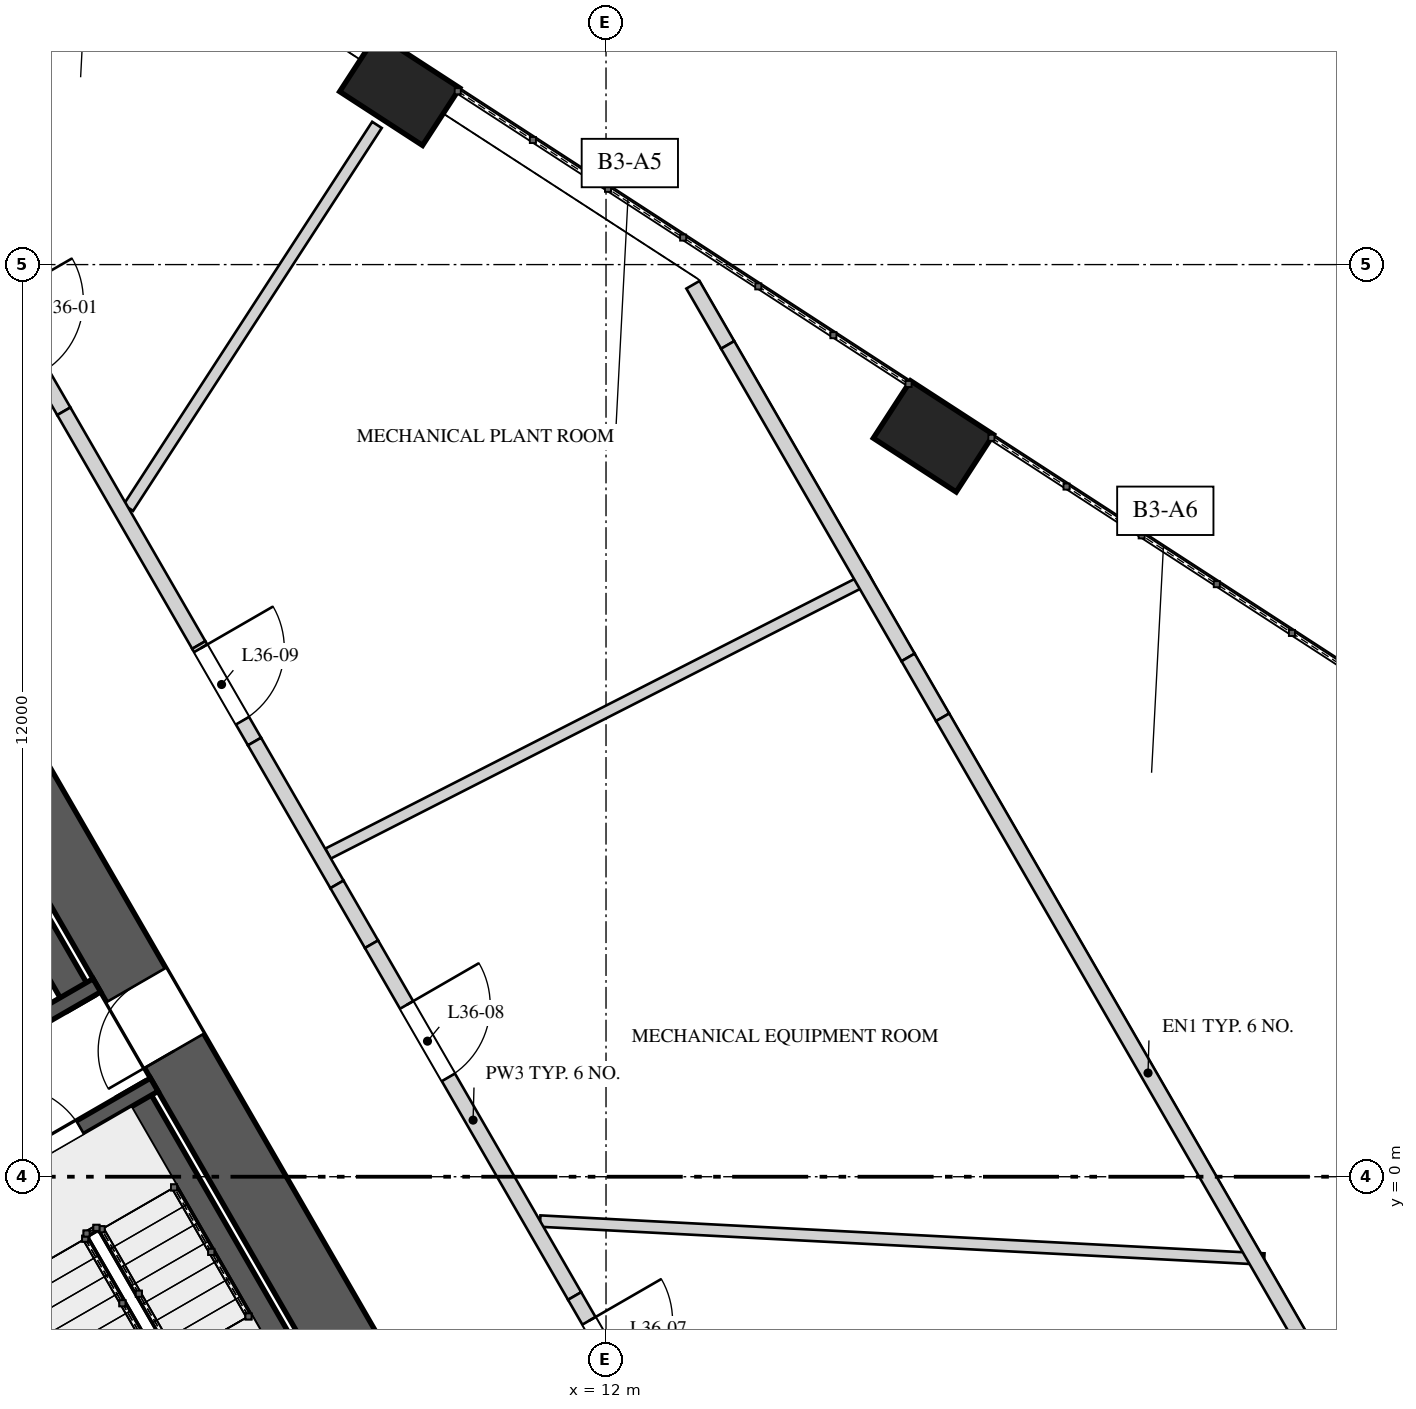
"""IFC4 building model, lengths in metres.
Left out: names, types, materials, properties, quantities, classifications, styles, units other than length and angle.
Written with IfcOpenShell. Run it as: python <this file> out.ifc"""

import sys

from ifc_helpers import new_model, si_unit, direction, frame, frame_2d, origin, origin_2d, place, context, subcontext, project, spatial, polyline, rectangle, outline, extrude, element, fill, save


model = new_model("IFC4")
c1 = context("Model", 3, precision=1e-05, world=origin(), true_north=direction((0.0, 1.0)))
c2 = subcontext(c1, "Body", "Model", "MODEL_VIEW")
j1 = project(units=[si_unit("LENGTHUNIT", "METRE"), si_unit("PLANEANGLEUNIT", "RADIAN")], contexts=[c1])
p1 = place(None, origin())
s1 = spatial("IfcSite", under=j1, at=p1, CompositionType="ELEMENT")
p2 = place(p1, origin())
s2 = spatial("IfcBuilding", under=s1, at=p2, CompositionType="ELEMENT")
p3 = place(p2, frame((0.0, 0.0, 157.6)))
s3 = spatial("IfcBuildingStorey", under=s2, at=p3, CompositionType="ELEMENT", Elevation=157.6)
p4 = place(p3, frame((9.729, -4.25, 0.0), z_axis=(0.0, 0.0, 1.0), x_axis=(-0.500004814304, 0.866022624227, 0.0)))
e1 = element("IfcWall", 1, at=p4, inside=s3, PredefinedType="SHEAR", context=c2, shape_type="SweptSolid", body=[
    extrude(rectangle(XDim=17.09, YDim=0.9, at=frame_2d((8.545, 0.0))), origin(), (0.0, 0.0, 1.0), 5.2),
])
p5 = place(p4, frame((6.82, 0.0, 0.0)))
e2 = element("IfcOpeningElement", 2, at=p5, cuts=e1, PredefinedType="OPENING", context=c2, shape_type="SweptSolid", body=[
    extrude(rectangle(XDim=1.0, YDim=2.4, at=frame_2d((0.5, 1.2))), frame((0.0, 0.46, 0.0), z_axis=(0.0, -1.0, 0.0), x_axis=(1.0, 0.0, 0.0)), (0.0, 0.0, 1.0), 0.92),
])
p6 = place(p4, frame((14.184, 0.0, 0.0)))
e3 = element("IfcOpeningElement", 3, at=p6, cuts=e1, PredefinedType="OPENING", context=c2, shape_type="SweptSolid", body=[
    extrude(rectangle(XDim=0.8, YDim=2.1, at=frame_2d((0.4, 1.05))), frame((0.0, 0.46, 0.0), z_axis=(0.0, -1.0, 0.0), x_axis=(1.0, 0.0, 0.0)), (0.0, 0.0, 1.0), 0.92),
])
for number, where, z_axis, x_axis in (
    (4, (16.307, 9.74, 0.0), (0.0, 0.0, 1.0), (-0.839, 0.545, 0.0)),
    (5, (9.286, 14.299, 0.0), (0.0, 0.0, 1.0), (-0.839, 0.545, 0.0)),
):
    element("IfcColumn", number, at=place(p3, frame(where, z_axis=z_axis, x_axis=x_axis)), inside=s3, PredefinedType="COLUMN", context=c2, shape_type="SweptSolid", body=[
        extrude(rectangle(XDim=1.3, YDim=0.9, at=origin_2d()), origin(), (0.0, 0.0, 1.0), 2.835),
    ])
p7 = place(p3, frame((8.846, -4.222, 0.0), z_axis=(0.0, 0.0, 1.0), x_axis=(-0.500009909098, 0.866019682689, 0.0)))
e6 = element("IfcWall", 6, at=p7, inside=s3, PredefinedType="SOLIDWALL", context=c2, shape_type="SweptSolid", body=[
    extrude(rectangle(XDim=6.2, YDim=0.4, at=frame_2d((3.1, 0.0))), origin(), (0.0, 0.0, 1.0), 4.85),
])
p8 = place(p3, frame((6.611, -5.85, 0.0), z_axis=(0.0, 0.0, 1.0), x_axis=(-0.499965531574, 0.866045303225, 0.0)))
e7 = element("IfcWall", 7, at=p8, inside=s3, PredefinedType="SOLIDWALL", context=c2, shape_type="SweptSolid", body=[
    extrude(rectangle(XDim=6.492, YDim=0.2, at=frame_2d((3.246, 0.0))), origin(), (0.0, 0.0, 1.0), 4.85),
])
p9 = place(p3, frame((3.501, -0.265, 0.0), z_axis=(0.0, 0.0, 1.0), x_axis=(0.866039495442, 0.49997559174, 0.0)))
e8 = element("IfcWall", 8, at=p9, inside=s3, PredefinedType="SOLIDWALL", context=c2, shape_type="SweptSolid", body=[
    extrude(rectangle(XDim=2.95, YDim=0.2, at=frame_2d((1.475, 0.0))), origin(), (0.0, 0.0, 1.0), 4.85),
])
p10 = place(p9, frame((0.725, 0.0, 0.0)))
e9 = element("IfcOpeningElement", 9, at=p10, cuts=e8, PredefinedType="OPENING", context=c2, shape_type="SweptSolid", body=[
    extrude(rectangle(XDim=1.1, YDim=2.4, at=frame_2d((0.55, 1.2))), frame((0.0, 0.11, 0.0), z_axis=(0.0, -1.0, 0.0), x_axis=(1.0, 0.0, 0.0)), (0.0, 0.0, 1.0), 0.22),
])
p11 = place(p3, frame((5.092, 2.281, 0.0), z_axis=(0.0, 0.0, 1.0), x_axis=(-0.500018594424, 0.866014668023, 0.0)))
e10 = element("IfcWall", 10, at=p11, inside=s3, PredefinedType="SOLIDWALL", context=c2, shape_type="SweptSolid", body=[
    extrude(rectangle(XDim=4.9, YDim=0.4, at=frame_2d((2.45, 0.0))), origin(), (0.0, 0.0, 1.0), 4.85),
])
p12 = place(p3, frame((2.227, 0.743, 0.0), z_axis=(0.0, 0.0, 1.0), x_axis=(0.866012656725, 0.500022077904, 0.0)))
e11 = element("IfcWall", 11, at=p12, inside=s3, PredefinedType="SOLIDWALL", context=c2, shape_type="SweptSolid", body=[
    extrude(rectangle(XDim=3.55, YDim=0.2, at=frame_2d((1.775, 0.0))), origin(), (0.0, 0.0, 1.0), 4.85),
])
p13 = place(p3, frame((8.342, 4.251, 0.0), z_axis=(0.0, 0.0, 1.0), x_axis=(0.891018796903, 0.453966412377, 0.0)))
e12 = element("IfcWall", 12, at=p13, inside=s3, PredefinedType="PARTITIONING", context=c2, shape_type="SweptSolid", body=[
    extrude(rectangle(XDim=8.011, YDim=0.15, at=frame_2d((4.005, 0.0))), origin(), (0.0, 0.0, 1.0), 4.85),
])
p14 = place(p3, frame((8.987, 13.838, 0.0), z_axis=(0.0, 0.0, 1.0), x_axis=(-0.544632548775, -0.838674780123, 0.0)))
e13 = element("IfcWall", 13, at=p14, inside=s3, PredefinedType="PARTITIONING", context=c2, shape_type="SweptSolid", body=[
    extrude(rectangle(XDim=6.006, YDim=0.15, at=frame_2d((3.003, 0.0))), origin(), (0.0, 0.0, 1.0), 4.85),
])
p15 = place(p3, frame((11.133, -0.583, 0.0), z_axis=(0.0, 0.0, 1.0), x_axis=(0.998629329727, -0.052339868248, 0.0)))
e14 = element("IfcWall", 14, at=p15, inside=s3, PredefinedType="PARTITIONING", context=c2, shape_type="SweptSolid", body=[
    extrude(rectangle(XDim=9.539, YDim=0.15, at=frame_2d((4.77, 0.0))), origin(), (0.0, 0.0, 1.0), 4.85),
])
p16 = place(p3, frame((3.998, 11.575, 0.0), z_axis=(0.0, 0.0, 1.0), x_axis=(0.500038750527, -0.866003030001, 0.0)))
e15 = element("IfcWall", 15, at=p16, inside=s3, PredefinedType="SOLIDWALL", context=c2, shape_type="SweptSolid", body=[
    extrude(outline(polyline([(0.0, 0.0), (1.737, 0.0), (1.737, 4.15), (0.872, 4.15), (0.872, 4.85), (0.0, 4.85), (0.0, 0.0)])), frame((0.0, 0.1, 0.0), z_axis=(0.0, -1.0, 0.0), x_axis=(1.0, 0.0, 0.0)), (0.0, 0.0, 1.0), 0.2),
])
p17 = place(p16, frame((0.05, 0.0, 0.0)))
e16 = element("IfcOpeningElement", 16, at=p17, cuts=e15, PredefinedType="OPENING", context=c2, shape_type="SweptSolid", body=[
    extrude(rectangle(XDim=1.1, YDim=2.2, at=frame_2d((0.55, 1.1))), frame((0.0, 0.11, 0.0), z_axis=(0.0, -1.0, 0.0), x_axis=(1.0, 0.0, 0.0)), (0.0, 0.0, 1.0), 0.22),
])
p18 = place(p3, frame((4.867, 10.071, 0.0), z_axis=(0.0, 0.0, 1.0), x_axis=(0.50003588878, -0.866004682396, 0.0)))
e17 = element("IfcWall", 17, at=p18, inside=s3, PredefinedType="SOLIDWALL", context=c2, shape_type="SweptSolid", body=[
    extrude(rectangle(XDim=3.551, YDim=0.2, at=frame_2d((1.775, 0.0))), origin(), (0.0, 0.0, 1.0), 4.85),
])
p19 = place(p3, frame((6.642, 6.995, 0.0), z_axis=(0.0, 0.0, 1.0), x_axis=(0.499953038101, -0.866052515552, 0.0)))
e18 = element("IfcWall", 18, at=p19, inside=s3, PredefinedType="SOLIDWALL", context=c2, shape_type="SweptSolid", body=[
    extrude(outline(polyline([(0.0, 0.0), (1.467, 0.0), (1.467, 4.15), (0.756, 4.15), (0.756, 4.85), (0.0, 4.85), (0.0, 0.0)])), frame((0.0, 0.1, 0.0), z_axis=(0.0, -1.0, 0.0), x_axis=(1.0, 0.0, 0.0)), (0.0, 0.0, 1.0), 0.2),
])
p20 = place(p19, frame((0.05, 0.0, 0.0)))
e19 = element("IfcOpeningElement", 19, at=p20, cuts=e18, PredefinedType="OPENING", context=c2, shape_type="SweptSolid", body=[
    extrude(rectangle(XDim=1.1, YDim=2.2, at=frame_2d((0.55, 1.1))), frame((0.0, 0.11, 0.0), z_axis=(0.0, -1.0, 0.0), x_axis=(1.0, 0.0, 0.0)), (0.0, 0.0, 1.0), 0.22),
])
p21 = place(p3, frame((7.375, 5.725, 0.0), z_axis=(0.0, 0.0, 1.0), x_axis=(0.499975720793, -0.866039420937, 0.0)))
e20 = element("IfcWall", 20, at=p21, inside=s3, PredefinedType="SOLIDWALL", context=c2, shape_type="SweptSolid", body=[
    extrude(rectangle(XDim=2.169, YDim=0.2, at=frame_2d((1.085, 0.0))), origin(), (0.0, 0.0, 1.0), 4.85),
])
p22 = place(p3, frame((8.46, 3.846, 0.0), z_axis=(0.0, 0.0, 1.0), x_axis=(0.499977996243, -0.866038107287, 0.0)))
e21 = element("IfcWall", 21, at=p22, inside=s3, PredefinedType="SOLIDWALL", context=c2, shape_type="SweptSolid", body=[
    extrude(rectangle(XDim=0.91, YDim=0.2, at=frame_2d((0.455, 0.0))), origin(), (0.0, 0.0, 1.0), 3.75),
])
p23 = place(p3, frame((8.915, 3.059, 0.0), z_axis=(0.0, 0.0, 1.0), x_axis=(0.500011158634, -0.866018961248, 0.0)))
e22 = element("IfcWall", 22, at=p23, inside=s3, PredefinedType="SOLIDWALL", context=c2, shape_type="SweptSolid", body=[
    extrude(rectangle(XDim=5.344, YDim=0.2, at=frame_2d((2.672, 0.0))), origin(), (0.0, 0.0, 1.0), 4.85),
])
p24 = place(p23, frame((0.922, 0.0, 0.0)))
e23 = element("IfcOpeningElement", 23, at=p24, cuts=e22, PredefinedType="OPENING", context=c2, shape_type="SweptSolid", body=[
    extrude(rectangle(XDim=1.1, YDim=2.2, at=frame_2d((0.55, 1.1))), frame((0.0, 0.11, 0.0), z_axis=(0.0, -1.0, 0.0), x_axis=(1.0, 0.0, 0.0)), (0.0, 0.0, 1.0), 0.22),
])
p25 = place(p3, frame((11.587, -1.569, 0.0), z_axis=(0.0, 0.0, 1.0), x_axis=(0.500008507724, -0.866020491792, 0.0)))
e24 = element("IfcWall", 24, at=p25, inside=s3, PredefinedType="SOLIDWALL", context=c2, shape_type="SweptSolid", body=[
    extrude(outline(polyline([(0.0, 0.0), (1.527, 0.0), (1.527, 4.85), (1.039, 4.85), (1.039, 3.95), (0.0, 3.95), (0.0, 0.0)])), frame((0.0, 0.1, 0.0), z_axis=(0.0, -1.0, 0.0), x_axis=(1.0, 0.0, 0.0)), (0.0, 0.0, 1.0), 0.2),
])
p26 = place(p25, frame((0.377, 0.0, 0.0)))
e25 = element("IfcOpeningElement", 25, at=p26, cuts=e24, PredefinedType="OPENING", context=c2, shape_type="SweptSolid", body=[
    extrude(rectangle(XDim=1.1, YDim=2.2, at=frame_2d((0.55, 1.1))), frame((0.0, 0.11, 0.0), z_axis=(0.0, -1.0, 0.0), x_axis=(1.0, 0.0, 0.0)), (0.0, 0.0, 1.0), 0.22),
])
p27 = place(p3, frame((13.144, 11.735, 0.0), z_axis=(0.0, 0.0, 1.0), x_axis=(0.500046162864, -0.865998750002, 0.0)))
e26 = element("IfcWall", 26, at=p27, inside=s3, PredefinedType="SOLIDWALL", context=c2, shape_type="SweptSolid", body=[
    extrude(rectangle(XDim=0.914, YDim=0.2, at=frame_2d((0.457, 0.0))), origin(), (0.0, 0.0, 1.0), 4.15),
])
p28 = place(p3, frame((13.601, 10.943, 0.0), z_axis=(0.0, 0.0, 1.0), x_axis=(0.499983650561, -0.866034842932, 0.0)))
e27 = element("IfcWall", 27, at=p28, inside=s3, PredefinedType="SOLIDWALL", context=c2, shape_type="SweptSolid", body=[
    extrude(rectangle(XDim=4.747, YDim=0.2, at=frame_2d((2.374, 0.0))), origin(), (0.0, 0.0, 1.0), 4.85),
])
p29 = place(p3, frame((15.974, 6.832, 0.0), z_axis=(0.0, 0.0, 1.0), x_axis=(0.499977996243, -0.866038107287, 0.0)))
e28 = element("IfcWall", 28, at=p29, inside=s3, PredefinedType="SOLIDWALL", context=c2, shape_type="SweptSolid", body=[
    extrude(rectangle(XDim=0.91, YDim=0.2, at=frame_2d((0.455, 0.0))), origin(), (0.0, 0.0, 1.0), 3.75),
])
p30 = place(p3, frame((16.429, 6.044, 0.0), z_axis=(0.0, 0.0, 1.0), x_axis=(0.500009239692, -0.86602006918, 0.0)))
e29 = element("IfcWall", 29, at=p30, inside=s3, PredefinedType="SOLIDWALL", context=c2, shape_type="SweptSolid", body=[
    extrude(rectangle(XDim=10.808, YDim=0.2, at=frame_2d((5.404, 0.0))), origin(), (0.0, 0.0, 1.0), 4.85),
])
p31 = place(p10, origin())
e30 = element("IfcDoor", 30, at=p31, inside=s3, OperationType="SINGLE_SWING_RIGHT", PredefinedType="DOOR", context=c2, shape_type="SweptSolid", body=[
    extrude(rectangle(XDim=1.1, YDim=2.4, at=frame_2d((0.55, 1.2))), frame((0.0, 0.025, 0.0), z_axis=(0.0, -1.0, 0.0), x_axis=(1.0, 0.0, 0.0)), (0.0, 0.0, 1.0), 0.05),
])
fill(e9, e30)
p32 = place(p5, origin())
e31 = element("IfcDoor", 31, at=p32, inside=s3, OperationType="SINGLE_SWING_RIGHT", PredefinedType="DOOR", context=c2, shape_type="SweptSolid", body=[
    extrude(rectangle(XDim=1.0, YDim=2.4, at=frame_2d((0.5, 1.2))), frame((0.0, 0.025, 0.0), z_axis=(0.0, -1.0, 0.0), x_axis=(1.0, 0.0, 0.0)), (0.0, 0.0, 1.0), 0.05),
])
fill(e2, e31)
p33 = place(p26, origin())
e32 = element("IfcDoor", 32, at=p33, inside=s3, OperationType="SINGLE_SWING_LEFT", PredefinedType="DOOR", context=c2, shape_type="SweptSolid", body=[
    extrude(rectangle(XDim=1.1, YDim=2.2, at=frame_2d((0.55, 1.1))), frame((0.0, 0.025, 0.0), z_axis=(0.0, -1.0, 0.0), x_axis=(1.0, 0.0, 0.0)), (0.0, 0.0, 1.0), 0.05),
])
fill(e25, e32)
p34 = place(p24, origin())
e33 = element("IfcDoor", 33, at=p34, inside=s3, OperationType="SINGLE_SWING_RIGHT", PredefinedType="DOOR", context=c2, shape_type="SweptSolid", body=[
    extrude(rectangle(XDim=1.1, YDim=2.2, at=frame_2d((0.55, 1.1))), frame((0.0, 0.025, 0.0), z_axis=(0.0, -1.0, 0.0), x_axis=(1.0, 0.0, 0.0)), (0.0, 0.0, 1.0), 0.05),
])
fill(e23, e33)
p35 = place(p20, origin())
e34 = element("IfcDoor", 34, at=p35, inside=s3, OperationType="SINGLE_SWING_LEFT", PredefinedType="DOOR", context=c2, shape_type="SweptSolid", body=[
    extrude(rectangle(XDim=1.1, YDim=2.2, at=frame_2d((0.55, 1.1))), frame((0.0, 0.025, 0.0), z_axis=(0.0, -1.0, 0.0), x_axis=(1.0, 0.0, 0.0)), (0.0, 0.0, 1.0), 0.05),
])
fill(e19, e34)
save(model, sys.argv[1])
